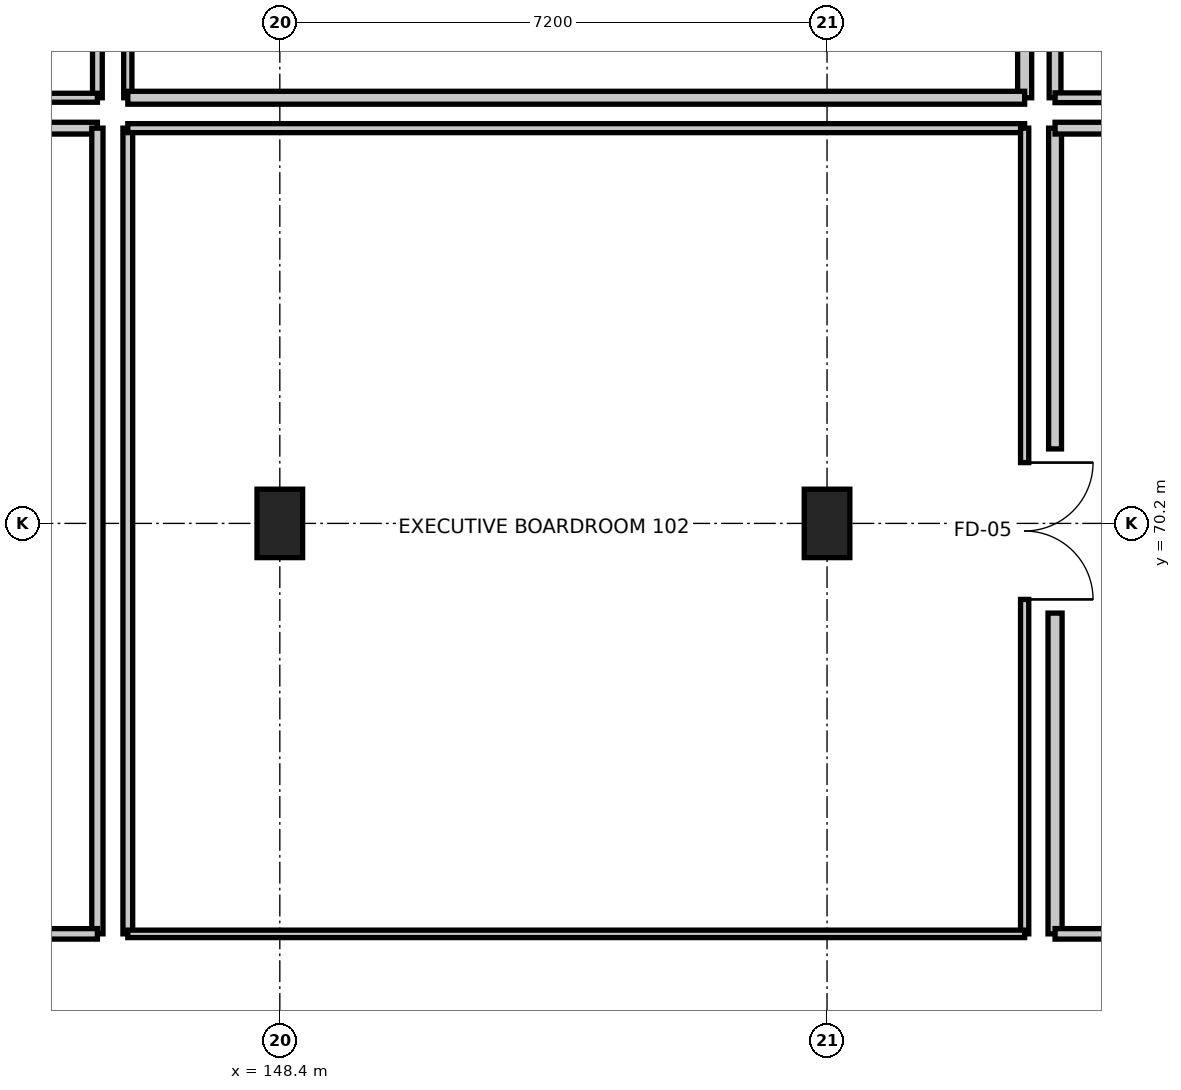
"""IFC4 building model, lengths in metres.
Left out: names, types, materials, properties, quantities, classifications, styles, units other than length and angle.
Written with IfcOpenShell. Run it as: python <this file> out.ifc"""

import sys

from ifc_helpers import new_model, si_unit, direction, frame, frame_2d, origin, origin_2d, place, context, subcontext, project, spatial, rectangle, extrude, element, fill, save


model = new_model("IFC4")
c1 = context("Model", 3, precision=1e-05, world=origin(), true_north=direction((0.0, 1.0)))
c2 = subcontext(c1, "Body", "Model", "MODEL_VIEW")
j1 = project(units=[si_unit("LENGTHUNIT", "METRE"), si_unit("PLANEANGLEUNIT", "RADIAN")], contexts=[c1])
p1 = place(None, origin())
s1 = spatial("IfcSite", under=j1, at=p1, CompositionType="ELEMENT")
p2 = place(p1, origin())
s2 = spatial("IfcBuilding", under=s1, at=p2, CompositionType="ELEMENT")
p3 = place(p2, frame((0.0, 0.0, 5.4)))
s3 = spatial("IfcBuildingStorey", under=s2, at=p3, CompositionType="ELEMENT", Elevation=5.4)
for number, where, z_axis, x_axis in (
    (1, (148.4, 70.2, 0.0), (0.0, 0.0, 1.0), (1.0, 0.0, 0.0)),
    (2, (155.6, 70.2, 0.0), (0.0, 0.0, 1.0), (1.0, 0.0, 0.0)),
):
    element("IfcColumn", number, at=place(p3, frame(where, z_axis=z_axis, x_axis=x_axis)), inside=s3, PredefinedType="COLUMN", context=c2, shape_type="SweptSolid", body=[
        extrude(rectangle(XDim=0.6, YDim=0.9, at=origin_2d()), origin(), (0.0, 0.0, 1.0), 5.1),
    ])
p4 = place(p3, frame((134.2, 75.4, 0.0), z_axis=(0.0, 0.0, 1.0), x_axis=(1.0, 0.0, 0.0)))
e3 = element("IfcWall", 3, at=p4, inside=s3, PredefinedType="PARTITIONING", context=c2, shape_type="SweptSolid", body=[
    extrude(rectangle(XDim=11.8, YDim=0.155, at=frame_2d((5.9, 0.0))), origin(), (0.0, 0.0, 1.0), 4.229),
])
p5 = place(p3, frame((146.0, 75.4, 0.0), z_axis=(0.0, 0.0, 1.0), x_axis=(0.0, -1.0, 0.0)))
e4 = element("IfcWall", 4, at=p5, inside=s3, PredefinedType="PARTITIONING", context=c2, shape_type="SweptSolid", body=[
    extrude(rectangle(XDim=10.6, YDim=0.148, at=frame_2d((5.3, 0.0))), origin(), (0.0, 0.0, 1.0), 4.115),
])
p6 = place(p3, frame((146.0, 64.8, 0.0), z_axis=(0.0, 0.0, 1.0), x_axis=(-1.0, 0.0, 0.0)))
e5 = element("IfcWall", 5, at=p6, inside=s3, PredefinedType="PARTITIONING", context=c2, shape_type="SweptSolid", body=[
    extrude(rectangle(XDim=11.8, YDim=0.138, at=frame_2d((5.9, 0.0))), origin(), (0.0, 0.0, 1.0), 4.229),
])
p7 = place(p3, frame((146.4, 64.8, 0.0), z_axis=(0.0, 0.0, 1.0), x_axis=(0.0, 1.0, 0.0)))
e6 = element("IfcWall", 6, at=p7, inside=s3, PredefinedType="PARTITIONING", context=c2, shape_type="SweptSolid", body=[
    extrude(rectangle(XDim=10.6, YDim=0.128, at=frame_2d((5.3, 0.0))), origin(), (0.0, 0.0, 1.0), 4.115),
])
p8 = place(p3, frame((146.4, 75.4, 0.0), z_axis=(0.0, 0.0, 1.0), x_axis=(1.0, 0.0, 0.0)))
e7 = element("IfcWall", 7, at=p8, inside=s3, PredefinedType="PARTITIONING", context=c2, shape_type="SweptSolid", body=[
    extrude(rectangle(XDim=11.8, YDim=0.118, at=frame_2d((5.9, 0.0))), origin(), (0.0, 0.0, 1.0), 4.229),
])
p9 = place(p3, frame((158.2, 75.4, 0.0), z_axis=(0.0, 0.0, 1.0), x_axis=(0.0, -1.0, 0.0)))
e8 = element("IfcWall", 8, at=p9, inside=s3, PredefinedType="PARTITIONING", context=c2, shape_type="SweptSolid", body=[
    extrude(rectangle(XDim=10.6, YDim=0.108, at=frame_2d((5.3, 0.0))), origin(), (0.0, 0.0, 1.0), 4.115),
])
p10 = place(p9, frame((4.4, 0.0, 0.0)))
e9 = element("IfcOpeningElement", 9, at=p10, cuts=e8, PredefinedType="OPENING", context=c2, shape_type="SweptSolid", body=[
    extrude(rectangle(XDim=1.8, YDim=2.2, at=frame_2d((0.9, 1.1))), frame((0.0, 0.064, 0.0), z_axis=(0.0, -1.0, 0.0), x_axis=(1.0, 0.0, 0.0)), (0.0, 0.0, 1.0), 0.128),
])
p11 = place(p3, frame((158.2, 64.8, 0.0), z_axis=(0.0, 0.0, 1.0), x_axis=(-1.0, 0.0, 0.0)))
e10 = element("IfcWall", 10, at=p11, inside=s3, PredefinedType="PARTITIONING", context=c2, shape_type="SweptSolid", body=[
    extrude(rectangle(XDim=11.8, YDim=0.098, at=frame_2d((5.9, 0.0))), origin(), (0.0, 0.0, 1.0), 4.229),
])
p12 = place(p3, frame((158.6, 64.8, 0.0), z_axis=(0.0, 0.0, 1.0), x_axis=(0.0, 1.0, 0.0)))
e11 = element("IfcWall", 11, at=p12, inside=s3, PredefinedType="PARTITIONING", context=c2, shape_type="SweptSolid", body=[
    extrude(rectangle(XDim=4.22, YDim=0.185, at=frame_2d((2.11, 0.0))), origin(), (0.0, 0.0, 1.0), 4.407),
])
p13 = place(p3, frame((158.6, 71.18, 0.0), z_axis=(0.0, 0.0, 1.0), x_axis=(0.0, 1.0, 0.0)))
e12 = element("IfcWall", 12, at=p13, inside=s3, PredefinedType="PARTITIONING", context=c2, shape_type="SweptSolid", body=[
    extrude(rectangle(XDim=4.22, YDim=0.17, at=frame_2d((2.11, 0.0))), origin(), (0.0, 0.0, 1.0), 4.407),
])
p14 = place(p3, frame((158.6, 75.4, 0.0), z_axis=(0.0, 0.0, 1.0), x_axis=(1.0, 0.0, 0.0)))
e13 = element("IfcWall", 13, at=p14, inside=s3, PredefinedType="PARTITIONING", context=c2, shape_type="SweptSolid", body=[
    extrude(rectangle(XDim=11.8, YDim=0.155, at=frame_2d((5.9, 0.0))), origin(), (0.0, 0.0, 1.0), 4.229),
])
p15 = place(p3, frame((170.4, 64.8, 0.0), z_axis=(0.0, 0.0, 1.0), x_axis=(-1.0, 0.0, 0.0)))
e14 = element("IfcWall", 14, at=p15, inside=s3, PredefinedType="PARTITIONING", context=c2, shape_type="SweptSolid", body=[
    extrude(rectangle(XDim=11.8, YDim=0.138, at=frame_2d((5.9, 0.0))), origin(), (0.0, 0.0, 1.0), 4.229),
])
p16 = place(p3, frame((146.0, 86.4, 0.0), z_axis=(0.0, 0.0, 1.0), x_axis=(0.0, -1.0, 0.0)))
e15 = element("IfcWall", 15, at=p16, inside=s3, PredefinedType="PARTITIONING", context=c2, shape_type="SweptSolid", body=[
    extrude(rectangle(XDim=10.6, YDim=0.128, at=frame_2d((5.3, 0.0))), origin(), (0.0, 0.0, 1.0), 4.115),
])
p17 = place(p3, frame((146.0, 75.8, 0.0), z_axis=(0.0, 0.0, 1.0), x_axis=(-1.0, 0.0, 0.0)))
e16 = element("IfcWall", 16, at=p17, inside=s3, PredefinedType="PARTITIONING", context=c2, shape_type="SweptSolid", body=[
    extrude(rectangle(XDim=11.8, YDim=0.118, at=frame_2d((5.9, 0.0))), origin(), (0.0, 0.0, 1.0), 4.229),
])
p18 = place(p3, frame((146.4, 75.8, 0.0), z_axis=(0.0, 0.0, 1.0), x_axis=(0.0, 1.0, 0.0)))
e17 = element("IfcWall", 17, at=p18, inside=s3, PredefinedType="PARTITIONING", context=c2, shape_type="SweptSolid", body=[
    extrude(rectangle(XDim=10.6, YDim=0.108, at=frame_2d((5.3, 0.0))), origin(), (0.0, 0.0, 1.0), 4.115),
])
p19 = place(p3, frame((158.2, 86.4, 0.0), z_axis=(0.0, 0.0, 1.0), x_axis=(0.0, -1.0, 0.0)))
e18 = element("IfcWall", 18, at=p19, inside=s3, PredefinedType="PARTITIONING", context=c2, shape_type="SweptSolid", body=[
    extrude(rectangle(XDim=10.6, YDim=0.185, at=frame_2d((5.3, 0.0))), origin(), (0.0, 0.0, 1.0), 4.115),
])
p20 = place(p3, frame((158.2, 75.8, 0.0), z_axis=(0.0, 0.0, 1.0), x_axis=(-1.0, 0.0, 0.0)))
e19 = element("IfcWall", 19, at=p20, inside=s3, PredefinedType="PARTITIONING", context=c2, shape_type="SweptSolid", body=[
    extrude(rectangle(XDim=11.8, YDim=0.17, at=frame_2d((5.9, 0.0))), origin(), (0.0, 0.0, 1.0), 4.229),
])
p21 = place(p3, frame((158.6, 75.8, 0.0), z_axis=(0.0, 0.0, 1.0), x_axis=(0.0, 1.0, 0.0)))
e20 = element("IfcWall", 20, at=p21, inside=s3, PredefinedType="PARTITIONING", context=c2, shape_type="SweptSolid", body=[
    extrude(rectangle(XDim=10.6, YDim=0.155, at=frame_2d((5.3, 0.0))), origin(), (0.0, 0.0, 1.0), 4.115),
])
p22 = place(p3, frame((170.4, 75.8, 0.0), z_axis=(0.0, 0.0, 1.0), x_axis=(-1.0, 0.0, 0.0)))
e21 = element("IfcWall", 21, at=p22, inside=s3, PredefinedType="PARTITIONING", context=c2, shape_type="SweptSolid", body=[
    extrude(rectangle(XDim=11.8, YDim=0.128, at=frame_2d((5.9, 0.0))), origin(), (0.0, 0.0, 1.0), 4.229),
])
p23 = place(p10, origin())
e22 = element("IfcDoor", 22, at=p23, inside=s3, OperationType="DOUBLE_DOOR_SINGLE_SWING", PredefinedType="DOOR", context=c2, shape_type="SweptSolid", body=[
    extrude(rectangle(XDim=1.8, YDim=2.2, at=frame_2d((0.9, 1.1))), frame((0.0, 0.025, 0.0), z_axis=(0.0, -1.0, 0.0), x_axis=(1.0, 0.0, 0.0)), (0.0, 0.0, 1.0), 0.05),
])
fill(e9, e22)
save(model, sys.argv[1])
